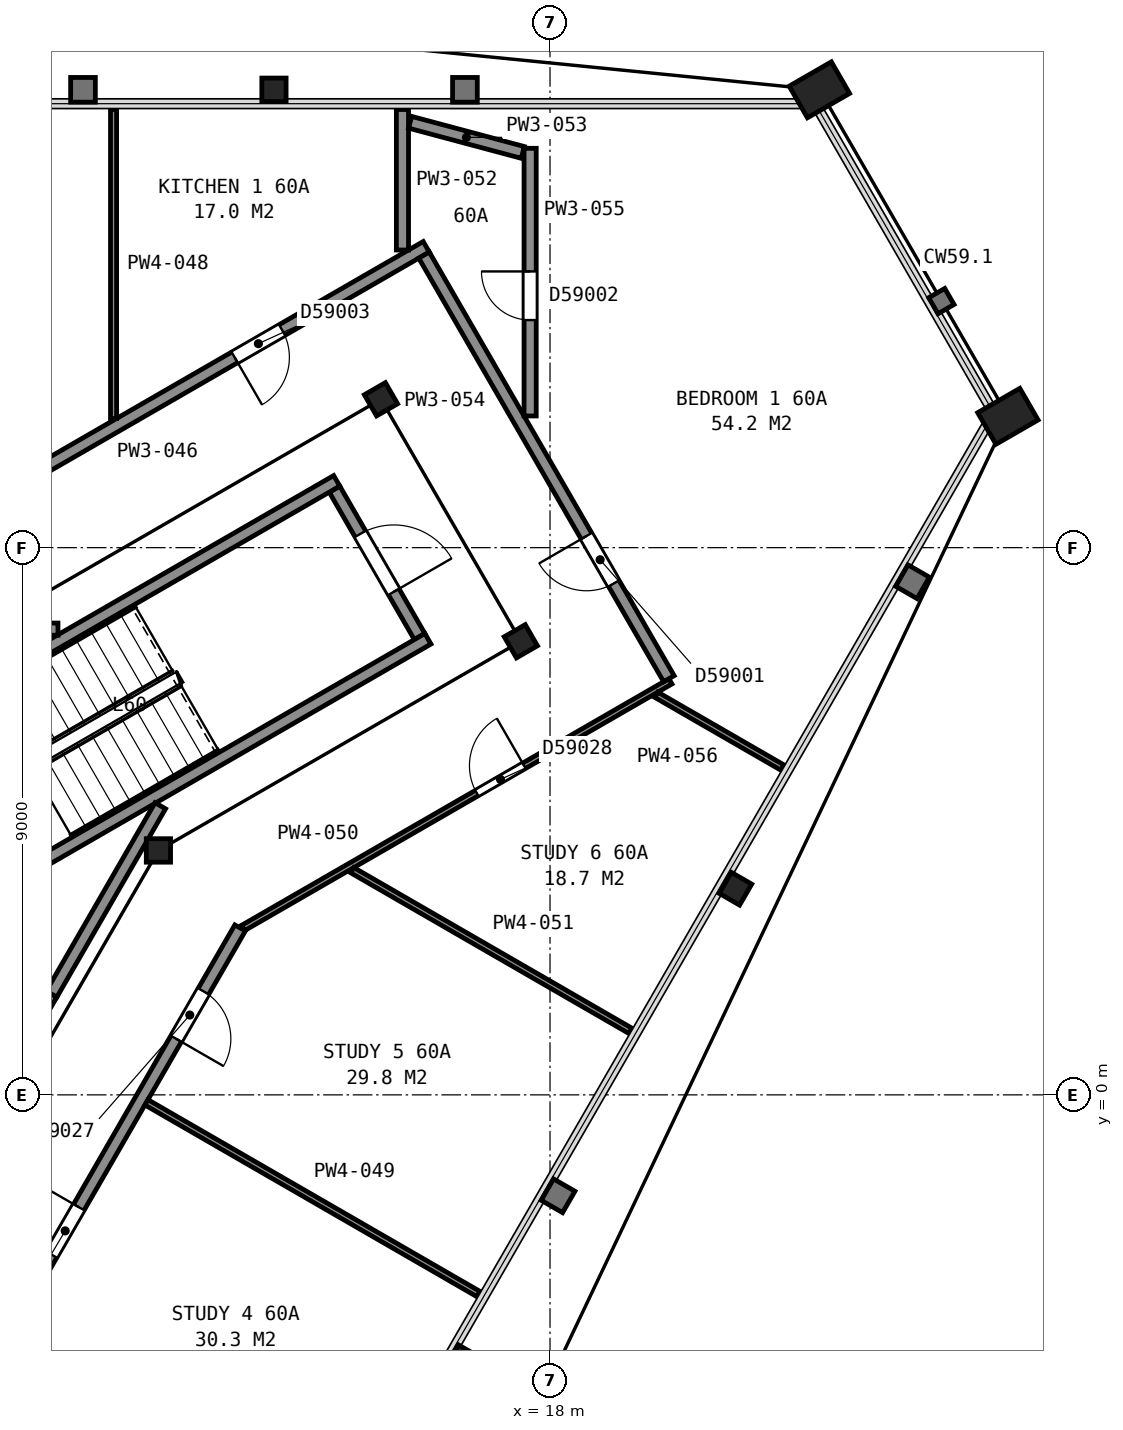
"""IFC4 building model, lengths in metres.
Left out: names, types, materials, properties, quantities, classifications, styles, units other than length and angle.
Written with IfcOpenShell. Run it as: python <this file> out.ifc"""

import sys

from ifc_helpers import new_model, si_unit, direction, frame, frame_2d, origin, origin_2d, place, context, subcontext, project, spatial, rectangle, hollow_rectangle, i_section, extrude, element, fill, save


model = new_model("IFC4")
c1 = context("Model", 3, precision=1e-05, world=origin(), true_north=direction((0.0, 1.0)))
c2 = subcontext(c1, "Body", "Model", "MODEL_VIEW")
j1 = project(units=[si_unit("LENGTHUNIT", "METRE"), si_unit("PLANEANGLEUNIT", "RADIAN")], contexts=[c1])
p1 = place(None, origin())
s1 = spatial("IfcSite", under=j1, at=p1, CompositionType="ELEMENT")
p2 = place(p1, origin())
s2 = spatial("IfcBuilding", under=s1, at=p2, CompositionType="ELEMENT")
p3 = place(p2, frame((0.0, 0.0, 239.7)))
s3 = spatial("IfcBuildingStorey", under=s2, at=p3, CompositionType="ELEMENT", Elevation=239.7)
p4 = place(p3, frame((22.43, 16.53, 0.0), z_axis=(0.0, 0.0, 1.0), x_axis=(0.5, -0.866025403784, 0.0)))
e1 = element("IfcColumn", 1, at=p4, inside=s3, PredefinedType="COLUMN", context=c2, shape_type="SweptSolid", body=[
    extrude(hollow_rectangle(XDim=0.6, YDim=0.8, WallThickness=0.05, at=origin_2d()), origin(), (0.0, 0.0, 1.0), 3.635),
])
for number, where, z_axis, x_axis in (
    (2, (13.46, 16.53, 0.0), (0.0, 0.0, 1.0), (1.0, 0.0, 0.0)),
    (3, (16.56, -4.38, 0.0), (0.0, 0.0, 1.0), (-0.5, -0.866, 0.0)),
    (4, (21.05, 3.39, 0.0), (0.0, 0.0, 1.0), (-0.5, -0.866, 0.0)),
):
    element("IfcColumn", number, at=place(p3, frame(where, z_axis=z_axis, x_axis=x_axis)), inside=s3, PredefinedType="COLUMN", context=c2, shape_type="SweptSolid", body=[
        extrude(i_section(OverallWidth=0.399, OverallDepth=0.386, WebThickness=0.021, FlangeThickness=0.033, FilletRadius=0.015, at=origin_2d()), origin(), (0.0, 0.0, 1.0), 3.665),
    ])
p5 = place(p3, frame((25.53, 11.16, 0.0), z_axis=(0.0, 0.0, 1.0), x_axis=(0.5, -0.866025403784, 0.0)))
e5 = element("IfcColumn", 5, at=p5, inside=s3, PredefinedType="COLUMN", context=c2, shape_type="SweptSolid", body=[
    extrude(hollow_rectangle(XDim=0.6, YDim=0.8, WallThickness=0.05, at=origin_2d()), origin(), (0.0, 0.0, 1.0), 3.635),
])
p6 = place(p3, frame((11.56, 4.02, 0.0), z_axis=(0.0, 0.0, 1.0), x_axis=(1.0, 0.0, 0.0)))
e6 = element("IfcColumn", 6, at=p6, inside=s3, PredefinedType="COLUMN", context=c2, shape_type="SweptSolid", body=[
    extrude(i_section(OverallWidth=0.399, OverallDepth=0.386, WebThickness=0.021, FlangeThickness=0.033, FilletRadius=0.015, at=origin_2d()), origin(), (0.0, 0.0, 1.0), 3.7),
])
for number, where, z_axis, x_axis in (
    (7, (17.52, 7.46, 0.0), (0.0, 0.0, 1.0), (0.5, -0.866, 0.0)),
    (8, (15.22, 11.44, 0.0), (0.0, 0.0, 1.0), (0.5, -0.866, 0.0)),
):
    element("IfcColumn", number, at=place(p3, frame(where, z_axis=z_axis, x_axis=x_axis)), inside=s3, PredefinedType="COLUMN", context=c2, shape_type="SweptSolid", body=[
        extrude(i_section(OverallWidth=0.401, OverallDepth=0.399, WebThickness=0.025, FlangeThickness=0.04, FilletRadius=0.015, at=origin_2d()), origin(), (0.0, 0.0, 1.0), 3.7),
    ])
p7 = place(p3, frame((15.855, 7.538, 0.0), z_axis=(0.0, 0.0, 1.0), x_axis=(-0.500049511043, 0.865996816683, 0.0)))
e9 = element("IfcWall", 9, at=p7, inside=s3, PredefinedType="PARTITIONING", context=c2, shape_type="SweptSolid", body=[
    extrude(rectangle(XDim=2.8, YDim=0.2, at=frame_2d((1.4, 0.0))), origin(), (0.0, 0.0, 1.0), 3.45),
])
p8 = place(p7, frame((0.85, 0.0, 0.0)))
e10 = element("IfcOpeningElement", 10, at=p8, cuts=e9, PredefinedType="OPENING", context=c2, shape_type="SweptSolid", body=[
    extrude(rectangle(XDim=1.1, YDim=2.1, at=frame_2d((0.55, 1.05))), frame((0.0, 0.11, 0.0), z_axis=(0.0, -1.0, 0.0), x_axis=(1.0, 0.0, 0.0)), (0.0, 0.0, 1.0), 0.22),
])
for number, where, z_axis, x_axis in (
    (11, (6.178, 5.299, 0.0), (0.0, 0.0, 1.0), (0.866, 0.5, 0.0)),
    (12, (7.678, 2.701, 0.0), (0.0, 0.0, 1.0), (0.866, 0.5, 0.0)),
):
    element("IfcWall", number, at=place(p3, frame(where, z_axis=z_axis, x_axis=x_axis)), inside=s3, PredefinedType="PARTITIONING", context=c2, shape_type="SweptSolid", body=[
        extrude(rectangle(XDim=9.6, YDim=0.2, at=frame_2d((4.8, 0.0))), origin(), (0.0, 0.0, 1.0), 3.45),
    ])
p9 = place(p3, frame((7.351, -2.587, 0.0), z_axis=(0.0, 0.0, 1.0), x_axis=(0.500002801628, 0.866023786258, 0.0)))
e13 = element("IfcWall", 13, at=p9, inside=s3, PredefinedType="PARTITIONING", context=c2, shape_type="SweptSolid", body=[
    extrude(rectangle(XDim=4.9, YDim=0.2, at=frame_2d((2.45, 0.0))), origin(), (0.0, 0.0, 1.0), 3.7),
])
p10 = place(p3, frame((-3.933, 7.66, 0.0), z_axis=(0.0, 0.0, 1.0), x_axis=(1.0, 0.0, 0.0)))
e14 = element("IfcWall", 14, at=p10, inside=s3, PredefinedType="PARTITIONING", context=c2, shape_type="SweptSolid", body=[
    extrude(rectangle(XDim=13.841, YDim=0.2, at=frame_2d((6.92, 0.0))), origin(), (0.0, 0.0, 1.0), 3.45),
])
p11 = place(p3, frame((9.803, 1.658, 0.0), z_axis=(0.0, 0.0, 1.0), x_axis=(0.499943114462, 0.866058244174, 0.0)))
e15 = element("IfcWall", 15, at=p11, inside=s3, PredefinedType="PARTITIONING", context=c2, shape_type="SweptSolid", body=[
    extrude(rectangle(XDim=3.576, YDim=0.2, at=frame_2d((1.788, 0.0))), origin(), (0.0, 0.0, 1.0), 3.45),
])
p12 = place(p3, frame((12.903, 2.745, 0.0), z_axis=(0.0, 0.0, 1.0), x_axis=(-0.499997769292, -0.86602669168, 0.0)))
e16 = element("IfcWall", 16, at=p12, inside=s3, PredefinedType="PARTITIONING", context=c2, shape_type="SweptSolid", body=[
    extrude(rectangle(XDim=17.706, YDim=0.2, at=frame_2d((8.853, 0.0))), origin(), (0.0, 0.0, 1.0), 2.713),
])
p13 = place(p12, frame((14.637, 0.0, 0.0)))
e17 = element("IfcOpeningElement", 17, at=p13, cuts=e16, PredefinedType="OPENING", context=c2, shape_type="SweptSolid", body=[
    extrude(rectangle(XDim=0.9, YDim=2.1, at=frame_2d((0.45, 1.05))), frame((0.0, 0.11, 0.0), z_axis=(0.0, -1.0, 0.0), x_axis=(1.0, 0.0, 0.0)), (0.0, 0.0, 1.0), 0.22),
])
p14 = place(p12, frame((11.858, 0.0, 0.0)))
e18 = element("IfcOpeningElement", 18, at=p14, cuts=e16, PredefinedType="OPENING", context=c2, shape_type="SweptSolid", body=[
    extrude(rectangle(XDim=0.9, YDim=2.1, at=frame_2d((0.45, 1.05))), frame((0.0, 0.11, 0.0), z_axis=(0.0, -1.0, 0.0), x_axis=(1.0, 0.0, 0.0)), (0.0, 0.0, 1.0), 0.22),
])
p15 = place(p12, frame((5.303, 0.0, 0.0)))
e19 = element("IfcOpeningElement", 19, at=p15, cuts=e16, PredefinedType="OPENING", context=c2, shape_type="SweptSolid", body=[
    extrude(rectangle(XDim=0.9, YDim=2.1, at=frame_2d((0.45, 1.05))), frame((0.0, 0.11, 0.0), z_axis=(0.0, -1.0, 0.0), x_axis=(1.0, 0.0, 0.0)), (0.0, 0.0, 1.0), 0.22),
])
p16 = place(p12, frame((1.204, 0.0, 0.0)))
e20 = element("IfcOpeningElement", 20, at=p16, cuts=e16, PredefinedType="OPENING", context=c2, shape_type="SweptSolid", body=[
    extrude(rectangle(XDim=0.9, YDim=2.1, at=frame_2d((0.45, 1.05))), frame((0.0, 0.11, 0.0), z_axis=(0.0, -1.0, 0.0), x_axis=(1.0, 0.0, 0.0)), (0.0, 0.0, 1.0), 0.22),
])
p17 = place(p3, frame((8.895, 9.867, 0.0), z_axis=(0.0, 0.0, 1.0), x_axis=(0.866081499088, 0.499902827495, 0.0)))
e21 = element("IfcWall", 21, at=p17, inside=s3, PredefinedType="PARTITIONING", context=c2, shape_type="SweptSolid", body=[
    extrude(rectangle(XDim=8.163, YDim=0.2, at=frame_2d((4.081, 0.0))), origin(), (0.0, 0.0, 1.0), 2.713),
])
p18 = place(p17, frame((4.525, 0.0, 0.0)))
e22 = element("IfcOpeningElement", 22, at=p18, cuts=e21, PredefinedType="OPENING", context=c2, shape_type="SweptSolid", body=[
    extrude(rectangle(XDim=0.9, YDim=2.1, at=frame_2d((0.45, 1.05))), frame((0.0, 0.11, 0.0), z_axis=(0.0, -1.0, 0.0), x_axis=(1.0, 0.0, 0.0)), (0.0, 0.0, 1.0), 0.22),
])
p19 = place(p3, frame((10.822, 11.124, 0.0), z_axis=(0.0, 0.0, 1.0), x_axis=(0.0, 1.0, 0.0)))
e23 = element("IfcWall", 23, at=p19, inside=s3, PredefinedType="PARTITIONING", context=c2, shape_type="SweptSolid", body=[
    extrude(rectangle(XDim=5.082, YDim=0.1, at=frame_2d((2.541, 0.0))), origin(), (0.0, 0.0, 1.0), 2.713),
])
p20 = place(p3, frame((11.363, -0.123, 0.0), z_axis=(0.0, 0.0, 1.0), x_axis=(0.866027573341, -0.4999962422, 0.0)))
e24 = element("IfcWall", 24, at=p20, inside=s3, PredefinedType="PARTITIONING", context=c2, shape_type="SweptSolid", body=[
    extrude(rectangle(XDim=6.304, YDim=0.1, at=frame_2d((3.152, 0.0))), origin(), (0.0, 0.0, 1.0), 2.713),
])
p21 = place(p3, frame((19.98, 6.801, 0.0), z_axis=(0.0, 0.0, 1.0), x_axis=(-0.866087400697, -0.49989260282, 0.0)))
e25 = element("IfcWall", 25, at=p21, inside=s3, PredefinedType="PARTITIONING", context=c2, shape_type="SweptSolid", body=[
    extrude(rectangle(XDim=8.115, YDim=0.1, at=frame_2d((4.058, 0.0))), origin(), (0.0, 0.0, 1.0), 2.713),
])
p22 = place(p21, frame((2.777, 0.0, 0.0)))
e26 = element("IfcOpeningElement", 26, at=p22, cuts=e25, PredefinedType="OPENING", context=c2, shape_type="SweptSolid", body=[
    extrude(rectangle(XDim=0.9, YDim=2.1, at=frame_2d((0.45, 1.05))), frame((0.0, 0.06, 0.0), z_axis=(0.0, -1.0, 0.0), x_axis=(1.0, 0.0, 0.0)), (0.0, 0.0, 1.0), 0.12),
])
p23 = place(p3, frame((14.748, 3.695, 0.0), z_axis=(0.0, 0.0, 1.0), x_axis=(0.86599232748, -0.500057285464, 0.0)))
e27 = element("IfcWall", 27, at=p23, inside=s3, PredefinedType="PARTITIONING", context=c2, shape_type="SweptSolid", body=[
    extrude(rectangle(XDim=5.281, YDim=0.1, at=frame_2d((2.64, 0.0))), origin(), (0.0, 0.0, 1.0), 2.713),
])
p24 = place(p3, frame((15.573, 13.895, 0.0), z_axis=(0.0, 0.0, 1.0), x_axis=(0.0, 1.0, 0.0)))
e28 = element("IfcWall", 28, at=p24, inside=s3, PredefinedType="PARTITIONING", context=c2, shape_type="SweptSolid", body=[
    extrude(rectangle(XDim=2.311, YDim=0.2, at=frame_2d((1.155, 0.0))), origin(), (0.0, 0.0, 1.0), 2.713),
])
p25 = place(p3, frame((15.699, 15.996, 0.0), z_axis=(0.0, 0.0, 1.0), x_axis=(0.96599800534, -0.258549518816, 0.0)))
e29 = element("IfcWall", 29, at=p25, inside=s3, PredefinedType="PARTITIONING", context=c2, shape_type="SweptSolid", body=[
    extrude(rectangle(XDim=1.919, YDim=0.2, at=frame_2d((0.959, 0.0))), origin(), (0.0, 0.0, 1.0), 2.713),
])
p26 = place(p3, frame((15.928, 13.812, 0.0), z_axis=(0.0, 0.0, 1.0), x_axis=(0.500422653123, -0.865781247337, 0.0)))
e30 = element("IfcWall", 30, at=p26, inside=s3, PredefinedType="PARTITIONING", context=c2, shape_type="SweptSolid", body=[
    extrude(rectangle(XDim=8.047, YDim=0.2, at=frame_2d((4.024, 0.0))), origin(), (0.0, 0.0, 1.0), 2.713),
])
p27 = place(p26, frame((5.337, 0.0, 0.0)))
e31 = element("IfcOpeningElement", 31, at=p27, cuts=e30, PredefinedType="OPENING", context=c2, shape_type="SweptSolid", body=[
    extrude(rectangle(XDim=0.9, YDim=2.1, at=frame_2d((0.45, 1.05))), frame((0.0, 0.11, 0.0), z_axis=(0.0, -1.0, 0.0), x_axis=(1.0, 0.0, 0.0)), (0.0, 0.0, 1.0), 0.22),
])
p28 = place(p3, frame((17.673, 11.166, 0.0), z_axis=(0.0, 0.0, 1.0), x_axis=(0.0, 1.0, 0.0)))
e32 = element("IfcWall", 32, at=p28, inside=s3, PredefinedType="PARTITIONING", context=c2, shape_type="SweptSolid", body=[
    extrude(rectangle(XDim=4.402, YDim=0.2, at=frame_2d((2.201, 0.0))), origin(), (0.0, 0.0, 1.0), 2.713),
])
p29 = place(p28, frame((1.577, 0.0, 0.0)))
e33 = element("IfcOpeningElement", 33, at=p29, cuts=e32, PredefinedType="OPENING", context=c2, shape_type="SweptSolid", body=[
    extrude(rectangle(XDim=0.8, YDim=2.1, at=frame_2d((0.4, 1.05))), frame((0.0, 0.11, 0.0), z_axis=(0.0, -1.0, 0.0), x_axis=(1.0, 0.0, 0.0)), (0.0, 0.0, 1.0), 0.22),
])
p30 = place(p3, frame((19.747, 6.581, 0.0), z_axis=(0.0, 0.0, 1.0), x_axis=(0.866139751882, -0.499801890962, 0.0)))
e34 = element("IfcWall", 34, at=p30, inside=s3, PredefinedType="PARTITIONING", context=c2, shape_type="SweptSolid", body=[
    extrude(rectangle(XDim=2.395, YDim=0.1, at=frame_2d((1.197, 0.0))), origin(), (0.0, 0.0, 1.0), 2.713),
])
p31 = place(p8, origin())
e35 = element("IfcDoor", 35, at=p31, inside=s3, OperationType="SINGLE_SWING_LEFT", PredefinedType="DOOR", context=c2, shape_type="SweptSolid", body=[
    extrude(rectangle(XDim=1.1, YDim=2.1, at=frame_2d((0.55, 1.05))), frame((0.0, 0.025, 0.0), z_axis=(0.0, -1.0, 0.0), x_axis=(1.0, 0.0, 0.0)), (0.0, 0.0, 1.0), 0.05),
])
fill(e10, e35)
p32 = place(p15, origin())
e36 = element("IfcDoor", 36, at=p32, inside=s3, OperationType="SINGLE_SWING_LEFT", PredefinedType="DOOR", context=c2, shape_type="SweptSolid", body=[
    extrude(rectangle(XDim=0.9, YDim=2.1, at=frame_2d((0.45, 1.05))), frame((0.0, 0.025, 0.0), z_axis=(0.0, -1.0, 0.0), x_axis=(1.0, 0.0, 0.0)), (0.0, 0.0, 1.0), 0.05),
])
fill(e19, e36)
p33 = place(p16, origin())
e37 = element("IfcDoor", 37, at=p33, inside=s3, OperationType="SINGLE_SWING_RIGHT", PredefinedType="DOOR", context=c2, shape_type="SweptSolid", body=[
    extrude(rectangle(XDim=0.9, YDim=2.1, at=frame_2d((0.45, 1.05))), frame((0.0, 0.025, 0.0), z_axis=(0.0, -1.0, 0.0), x_axis=(1.0, 0.0, 0.0)), (0.0, 0.0, 1.0), 0.05),
])
fill(e20, e37)
p34 = place(p18, origin())
e38 = element("IfcDoor", 38, at=p34, inside=s3, OperationType="SINGLE_SWING_LEFT", PredefinedType="DOOR", context=c2, shape_type="SweptSolid", body=[
    extrude(rectangle(XDim=0.9, YDim=2.1, at=frame_2d((0.45, 1.05))), frame((0.0, 0.025, 0.0), z_axis=(0.0, -1.0, 0.0), x_axis=(1.0, 0.0, 0.0)), (0.0, 0.0, 1.0), 0.05),
])
fill(e22, e38)
p35 = place(p22, origin())
e39 = element("IfcDoor", 39, at=p35, inside=s3, OperationType="SINGLE_SWING_LEFT", PredefinedType="DOOR", context=c2, shape_type="SweptSolid", body=[
    extrude(rectangle(XDim=0.9, YDim=2.1, at=frame_2d((0.45, 1.05))), frame((0.0, 0.025, 0.0), z_axis=(0.0, -1.0, 0.0), x_axis=(1.0, 0.0, 0.0)), (0.0, 0.0, 1.0), 0.05),
])
fill(e26, e39)
p36 = place(p27, origin())
e40 = element("IfcDoor", 40, at=p36, inside=s3, OperationType="SINGLE_SWING_LEFT", PredefinedType="DOOR", context=c2, shape_type="SweptSolid", body=[
    extrude(rectangle(XDim=0.9, YDim=2.1, at=frame_2d((0.45, 1.05))), frame((0.0, 0.025, 0.0), z_axis=(0.0, -1.0, 0.0), x_axis=(1.0, 0.0, 0.0)), (0.0, 0.0, 1.0), 0.05),
])
fill(e31, e40)
p37 = place(p29, origin())
e41 = element("IfcDoor", 41, at=p37, inside=s3, OperationType="SINGLE_SWING_RIGHT", PredefinedType="DOOR", context=c2, shape_type="SweptSolid", body=[
    extrude(rectangle(XDim=0.8, YDim=2.1, at=frame_2d((0.4, 1.05))), frame((0.0, 0.025, 0.0), z_axis=(0.0, -1.0, 0.0), x_axis=(1.0, 0.0, 0.0)), (0.0, 0.0, 1.0), 0.05),
])
fill(e33, e41)
save(model, sys.argv[1])
